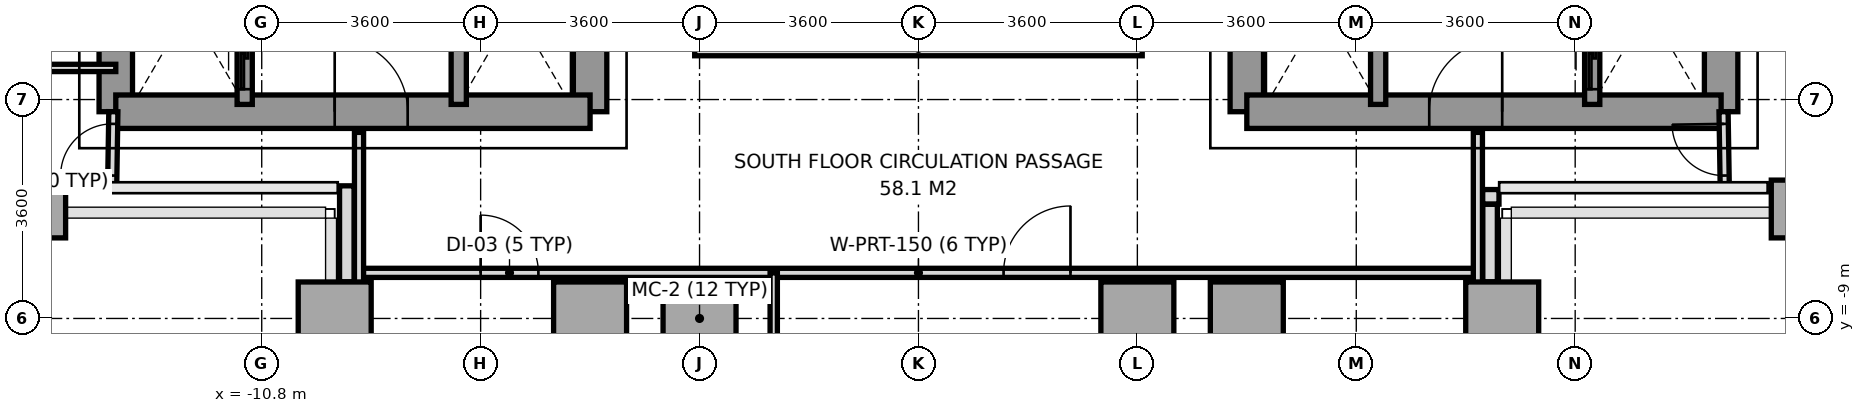
"""IFC4 building model, lengths in metres.
Left out: names, types, materials, properties, quantities, classifications, styles, units other than length and angle.
Written with IfcOpenShell. Run it as: python <this file> out.ifc"""

import sys

from ifc_helpers import new_model, si_unit, direction, frame, frame_2d, origin, origin_2d, place, context, subcontext, project, spatial, rectangle, extrude, source, transform, mapped, element, fill, save


model = new_model("IFC4")
c1 = context("Model", 3, precision=1e-05, world=origin(), true_north=direction((0.0, 1.0)))
c2 = subcontext(c1, "Body", "Model", "MODEL_VIEW")
j1 = project(units=[si_unit("LENGTHUNIT", "METRE"), si_unit("PLANEANGLEUNIT", "RADIAN")], contexts=[c1])
p1 = place(None, origin())
s1 = spatial("IfcSite", under=j1, at=p1, CompositionType="ELEMENT")
p2 = place(p1, origin())
s2 = spatial("IfcBuilding", under=s1, at=p2, CompositionType="ELEMENT")
p3 = place(p2, frame((0.0, 0.0, 37.4)))
s3 = spatial("IfcBuildingStorey", under=s2, at=p3, CompositionType="ELEMENT", Elevation=37.4)
m1 = source(origin(), c2, "Body", "SweptSolid", [
    extrude(rectangle(XDim=0.75, YDim=0.95, at=origin_2d()), origin(), (0.0, 0.0, 1.0), 3.2),
])
p4 = place(p3, frame((-14.4, -7.2, 0.0), z_axis=(0.0, 0.0, 1.0), x_axis=(1.0, 0.0, 0.0)))
e1 = element("IfcColumn", 1, at=p4, inside=s3, PredefinedType="COLUMN", context=c2, shape_type="MappedRepresentation", body=[
    mapped(m1, transform((0.0, 0.0, 0.0), x_axis=(1.0, 0.0, 0.0), y_axis=(0.0, 1.0, 0.0), z_axis=(0.0, 0.0, 1.0), scale=1.0)),
])
m2 = source(origin(), c2, "Body", "SweptSolid", [
    extrude(rectangle(XDim=1.2, YDim=1.2, at=origin_2d()), origin(), (0.0, 0.0, 1.0), 3.2),
])
for number, where, z_axis, x_axis in (
    (2, (-9.6, -9.0, 0.0), (0.0, 0.0, 1.0), (1.0, 0.0, 0.0)),
    (3, (-5.4, -9.0, 0.0), (0.0, 0.0, 1.0), (1.0, 0.0, 0.0)),
    (4, (-3.6, -9.0, 0.0), (0.0, 0.0, 1.0), (1.0, 0.0, 0.0)),
    (5, (3.6, -9.0, 0.0), (0.0, 0.0, 1.0), (1.0, 0.0, 0.0)),
    (6, (5.4, -9.0, 0.0), (0.0, 0.0, 1.0), (1.0, 0.0, 0.0)),
    (7, (9.6, -9.0, 0.0), (0.0, 0.0, 1.0), (1.0, 0.0, 0.0)),
):
    element("IfcColumn", number, at=place(p3, frame(where, z_axis=z_axis, x_axis=x_axis)), inside=s3, PredefinedType="COLUMN", context=c2, shape_type="MappedRepresentation", body=[
        mapped(m2, transform((0.0, 0.0, 0.0), x_axis=(1.0, 0.0, 0.0), y_axis=(0.0, 1.0, 0.0), z_axis=(0.0, 0.0, 1.0), scale=1.0)),
    ])
p5 = place(p3, frame((14.4, -7.2, 0.0), z_axis=(0.0, 0.0, 1.0), x_axis=(1.0, 0.0, 0.0)))
e8 = element("IfcColumn", 8, at=p5, inside=s3, PredefinedType="COLUMN", context=c2, shape_type="MappedRepresentation", body=[
    mapped(m1, transform((0.0, 0.0, 0.0), x_axis=(1.0, 0.0, 0.0), y_axis=(0.0, 1.0, 0.0), z_axis=(0.0, 0.0, 1.0), scale=1.0)),
])
p6 = place(p3, frame((9.547, -7.0, 0.0), z_axis=(0.0, 0.0, 1.0), x_axis=(-1.0, 0.0, 0.0)))
e9 = element("IfcWall", 9, at=p6, inside=s3, PredefinedType="PARAPET", context=c2, shape_type="SweptSolid", body=[
    extrude(rectangle(XDim=0.269, YDim=0.24, at=frame_2d((0.135, 0.0))), origin(), (0.0, 0.0, 1.0), 1.15),
])
p7 = place(p3, frame((9.4, -7.123, 0.0), z_axis=(0.0, 0.0, 1.0), x_axis=(0.0, -1.0, 0.0)))
e10 = element("IfcWall", 10, at=p7, inside=s3, PredefinedType="PARAPET", context=c2, shape_type="SweptSolid", body=[
    extrude(rectangle(XDim=1.274, YDim=0.24, at=frame_2d((0.637, 0.0))), origin(), (0.0, 0.0, 1.0), 1.15),
])
p8 = place(p3, frame((-9.4, -8.397, 0.0), z_axis=(0.0, 0.0, 1.0), x_axis=(0.0, 1.0, 0.0)))
e11 = element("IfcWall", 11, at=p8, inside=s3, PredefinedType="PARAPET", context=c2, shape_type="SweptSolid", body=[
    extrude(rectangle(XDim=1.578, YDim=0.24, at=frame_2d((0.789, 0.0))), origin(), (0.0, 0.0, 1.0), 1.15),
])
p9 = place(p3, frame((-13.2, -5.6, 0.0), z_axis=(0.0, 0.0, 1.0), x_axis=(0.0, 1.0, 0.0)))
e12 = element("IfcWall", 12, at=p9, inside=s3, PredefinedType="SHEAR", context=c2, shape_type="SweptSolid", body=[
    extrude(rectangle(XDim=11.2, YDim=0.55, at=frame_2d((5.6, 0.0))), origin(), (0.0, 0.0, 1.0), 3.2),
])
p10 = place(p3, frame((-5.4, -5.6, 0.0), z_axis=(0.0, 0.0, 1.0), x_axis=(0.0, 1.0, 0.0)))
e13 = element("IfcWall", 13, at=p10, inside=s3, PredefinedType="SHEAR", context=c2, shape_type="SweptSolid", body=[
    extrude(rectangle(XDim=12.5, YDim=0.55, at=frame_2d((6.25, 0.0))), origin(), (0.0, 0.0, 1.0), 3.2),
])
p11 = place(p10, frame((4.55, 0.0, 0.0)))
e14 = element("IfcOpeningElement", 14, at=p11, cuts=e13, PredefinedType="OPENING", context=c2, shape_type="SweptSolid", body=[
    extrude(rectangle(XDim=1.2, YDim=2.2, at=frame_2d((0.6, 1.1))), frame((0.0, 0.285, 0.0), z_axis=(0.0, -1.0, 0.0), x_axis=(1.0, 0.0, 0.0)), (0.0, 0.0, 1.0), 0.57),
])
p12 = place(p10, frame((6.86, 0.0, 0.0)))
e15 = element("IfcOpeningElement", 15, at=p12, cuts=e13, PredefinedType="OPENING", context=c2, shape_type="SweptSolid", body=[
    extrude(rectangle(XDim=0.8, YDim=2.1, at=frame_2d((0.4, 1.05))), frame((0.0, 0.285, 0.0), z_axis=(0.0, -1.0, 0.0), x_axis=(1.0, 0.0, 0.0)), (0.0, 0.0, 1.0), 0.57),
])
p13 = place(p3, frame((-13.2, -5.6, 0.0), z_axis=(0.0, 0.0, 1.0), x_axis=(1.0, 0.0, 0.0)))
e16 = element("IfcWall", 16, at=p13, inside=s3, PredefinedType="SHEAR", context=c2, shape_type="SweptSolid", body=[
    extrude(rectangle(XDim=7.8, YDim=0.55, at=frame_2d((3.9, 0.0))), origin(), (0.0, 0.0, 1.0), 3.2),
])
p14 = place(p13, frame((3.6, 0.0, 0.0)))
e17 = element("IfcOpeningElement", 17, at=p14, cuts=e16, PredefinedType="OPENING", context=c2, shape_type="SweptSolid", body=[
    extrude(rectangle(XDim=1.2, YDim=2.2, at=frame_2d((0.6, 1.1))), frame((0.0, 0.285, 0.0), z_axis=(0.0, -1.0, 0.0), x_axis=(1.0, 0.0, 0.0)), (0.0, 0.0, 1.0), 0.57),
])
p15 = place(p3, frame((13.2, -5.6, 0.0), z_axis=(0.0, 0.0, 1.0), x_axis=(0.0, 1.0, 0.0)))
e18 = element("IfcWall", 18, at=p15, inside=s3, PredefinedType="SHEAR", context=c2, shape_type="SweptSolid", body=[
    extrude(rectangle(XDim=11.2, YDim=0.55, at=frame_2d((5.6, 0.0))), origin(), (0.0, 0.0, 1.0), 3.2),
])
p16 = place(p3, frame((5.4, -5.6, 0.0), z_axis=(0.0, 0.0, 1.0), x_axis=(0.0, 1.0, 0.0)))
e19 = element("IfcWall", 19, at=p16, inside=s3, PredefinedType="SHEAR", context=c2, shape_type="SweptSolid", body=[
    extrude(rectangle(XDim=12.5, YDim=0.55, at=frame_2d((6.25, 0.0))), origin(), (0.0, 0.0, 1.0), 3.2),
])
p17 = place(p16, frame((4.55, 0.0, 0.0)))
e20 = element("IfcOpeningElement", 20, at=p17, cuts=e19, PredefinedType="OPENING", context=c2, shape_type="SweptSolid", body=[
    extrude(rectangle(XDim=1.2, YDim=2.2, at=frame_2d((0.6, 1.1))), frame((0.0, 0.285, 0.0), z_axis=(0.0, -1.0, 0.0), x_axis=(1.0, 0.0, 0.0)), (0.0, 0.0, 1.0), 0.57),
])
p18 = place(p16, frame((6.86, 0.0, 0.0)))
e21 = element("IfcOpeningElement", 21, at=p18, cuts=e19, PredefinedType="OPENING", context=c2, shape_type="SweptSolid", body=[
    extrude(rectangle(XDim=0.8, YDim=2.1, at=frame_2d((0.4, 1.05))), frame((0.0, 0.285, 0.0), z_axis=(0.0, -1.0, 0.0), x_axis=(1.0, 0.0, 0.0)), (0.0, 0.0, 1.0), 0.57),
])
p19 = place(p3, frame((5.4, -5.6, 0.0), z_axis=(0.0, 0.0, 1.0), x_axis=(1.0, 0.0, 0.0)))
e22 = element("IfcWall", 22, at=p19, inside=s3, PredefinedType="SHEAR", context=c2, shape_type="SweptSolid", body=[
    extrude(rectangle(XDim=7.8, YDim=0.55, at=frame_2d((3.9, 0.0))), origin(), (0.0, 0.0, 1.0), 3.2),
])
p20 = place(p19, frame((3.0, 0.0, 0.0)))
e23 = element("IfcOpeningElement", 23, at=p20, cuts=e22, PredefinedType="OPENING", context=c2, shape_type="SweptSolid", body=[
    extrude(rectangle(XDim=1.2, YDim=2.2, at=frame_2d((0.6, 1.1))), frame((0.0, 0.285, 0.0), z_axis=(0.0, -1.0, 0.0), x_axis=(1.0, 0.0, 0.0)), (0.0, 0.0, 1.0), 0.57),
])
p21 = place(p3, frame((-11.08, -5.48, 0.0), z_axis=(0.0, 0.0, 1.0), x_axis=(0.0, 1.0, 0.0)))
e24 = element("IfcWall", 24, at=p21, inside=s3, PredefinedType="SOLIDWALL", context=c2, shape_type="SweptSolid", body=[
    extrude(rectangle(XDim=1.6, YDim=0.25, at=frame_2d((0.8, 0.0))), origin(), (0.0, 0.0, 1.0), 3.2),
])
p22 = place(p21, frame((0.25, 0.0, 0.0)))
e25 = element("IfcOpeningElement", 25, at=p22, cuts=e24, PredefinedType="OPENING", context=c2, shape_type="SweptSolid", body=[
    extrude(rectangle(XDim=1.1, YDim=2.2, at=frame_2d((0.55, 1.1))), frame((0.0, 0.135, 0.0), z_axis=(0.0, -1.0, 0.0), x_axis=(1.0, 0.0, 0.0)), (0.0, 0.0, 1.0), 0.27),
])
p23 = place(p3, frame((11.08, -5.48, 0.0), z_axis=(0.0, 0.0, 1.0), x_axis=(0.0, 1.0, 0.0)))
e26 = element("IfcWall", 26, at=p23, inside=s3, PredefinedType="SOLIDWALL", context=c2, shape_type="SweptSolid", body=[
    extrude(rectangle(XDim=1.6, YDim=0.25, at=frame_2d((0.8, 0.0))), origin(), (0.0, 0.0, 1.0), 3.2),
])
p24 = place(p23, frame((0.25, 0.0, 0.0)))
e27 = element("IfcOpeningElement", 27, at=p24, cuts=e26, PredefinedType="OPENING", context=c2, shape_type="SweptSolid", body=[
    extrude(rectangle(XDim=1.1, YDim=2.2, at=frame_2d((0.55, 1.1))), frame((0.0, 0.135, 0.0), z_axis=(0.0, -1.0, 0.0), x_axis=(1.0, 0.0, 0.0)), (0.0, 0.0, 1.0), 0.27),
])
for number, where, z_axis, x_axis in (
    (28, (-7.56, -5.48, 0.0), (0.0, 0.0, 1.0), (0.0, 1.0, 0.0)),
    (29, (7.56, -5.48, 0.0), (0.0, 0.0, 1.0), (0.0, 1.0, 0.0)),
):
    element("IfcWall", number, at=place(p3, frame(where, z_axis=z_axis, x_axis=x_axis)), inside=s3, PredefinedType="SOLIDWALL", context=c2, shape_type="SweptSolid", body=[
        extrude(rectangle(XDim=1.6, YDim=0.25, at=frame_2d((0.8, 0.0))), origin(), (0.0, 0.0, 1.0), 3.2),
    ])
p25 = place(p3, frame((-9.2, -8.25, 0.0), z_axis=(0.0, 0.0, 1.0), x_axis=(1.0, 0.0, 0.0)))
e30 = element("IfcWall", 30, at=p25, inside=s3, PredefinedType="PARTITIONING", context=c2, shape_type="SweptSolid", body=[
    extrude(rectangle(XDim=18.4, YDim=0.15, at=frame_2d((9.2, 0.0))), origin(), (0.0, 0.0, 1.0), 2.7),
])
p26 = place(p25, frame((2.0, 0.0, 0.0)))
e31 = element("IfcOpeningElement", 31, at=p26, cuts=e30, PredefinedType="OPENING", context=c2, shape_type="SweptSolid", body=[
    extrude(rectangle(XDim=0.95, YDim=2.15, at=frame_2d((0.475, 1.075))), frame((0.0, 0.085, 0.0), z_axis=(0.0, -1.0, 0.0), x_axis=(1.0, 0.0, 0.0)), (0.0, 0.0, 1.0), 0.17),
])
p27 = place(p25, frame((10.6, 0.0, 0.0)))
e32 = element("IfcOpeningElement", 32, at=p27, cuts=e30, PredefinedType="OPENING", context=c2, shape_type="SweptSolid", body=[
    extrude(rectangle(XDim=1.1, YDim=2.2, at=frame_2d((0.55, 1.1))), frame((0.0, 0.085, 0.0), z_axis=(0.0, -1.0, 0.0), x_axis=(1.0, 0.0, 0.0)), (0.0, 0.0, 1.0), 0.17),
])
for number, where, z_axis, x_axis in (
    (33, (-9.2, -15.68, 0.0), (0.0, 0.0, 1.0), (0.0, 1.0, 0.0)),
    (34, (9.2, -15.68, 0.0), (0.0, 0.0, 1.0), (0.0, 1.0, 0.0)),
):
    element("IfcWall", number, at=place(p3, frame(where, z_axis=z_axis, x_axis=x_axis)), inside=s3, PredefinedType="PARTITIONING", context=c2, shape_type="SweptSolid", body=[
        extrude(rectangle(XDim=9.74, YDim=0.15, at=frame_2d((4.87, 0.0))), origin(), (0.0, 0.0, 1.0), 2.65),
    ])
p28 = place(p3, frame((-2.38, -24.65, 0.0), z_axis=(0.0, 0.0, 1.0), x_axis=(0.0, 1.0, 0.0)))
e35 = element("IfcWall", 35, at=p28, inside=s3, PredefinedType="PARTITIONING", context=c2, shape_type="SweptSolid", body=[
    extrude(rectangle(XDim=16.4, YDim=0.12, at=frame_2d((8.2, 0.0))), origin(), (0.0, 0.0, 1.0), 2.65),
])
p29 = place(p3, frame((-13.26, -6.85, 0.0), z_axis=(0.0, 0.0, 1.0), x_axis=(0.016013571389, 0.999871774545, 0.0)))
e36 = element("IfcWall", 36, at=p29, inside=s3, PredefinedType="PARTITIONING", context=c2, shape_type="SweptSolid", body=[
    extrude(rectangle(XDim=1.25, YDim=0.15, at=frame_2d((0.625, 0.0))), origin(), (0.0, 0.0, 1.0), 3.2),
])
p30 = place(p29, frame((0.2, 0.0, 0.0)))
e37 = element("IfcOpeningElement", 37, at=p30, cuts=e36, PredefinedType="OPENING", context=c2, shape_type="SweptSolid", body=[
    extrude(rectangle(XDim=0.85, YDim=2.1, at=frame_2d((0.425, 1.05))), frame((0.0, 0.085, 0.0), z_axis=(0.0, -1.0, 0.0), x_axis=(1.0, 0.0, 0.0)), (0.0, 0.0, 1.0), 0.17),
])
p31 = place(p3, frame((-24.57, -4.88, 0.0), z_axis=(0.0, 0.0, 1.0), x_axis=(1.0, 0.0, 0.0)))
e38 = element("IfcWall", 38, at=p31, inside=s3, PredefinedType="PARTITIONING", context=c2, shape_type="SweptSolid", body=[
    extrude(rectangle(XDim=11.37, YDim=0.12, at=frame_2d((5.685, 0.0))), origin(), (0.0, 0.0, 1.0), 2.7),
])
p32 = place(p31, frame((2.2, 0.0, 0.0)))
e39 = element("IfcOpeningElement", 39, at=p32, cuts=e38, PredefinedType="OPENING", context=c2, shape_type="SweptSolid", body=[
    extrude(rectangle(XDim=0.95, YDim=2.15, at=frame_2d((0.475, 1.075))), frame((0.0, 0.07, 0.0), z_axis=(0.0, -1.0, 0.0), x_axis=(1.0, 0.0, 0.0)), (0.0, 0.0, 1.0), 0.14),
])
p33 = place(p3, frame((13.26, -6.85, 0.0), z_axis=(0.0, 0.0, 1.0), x_axis=(-0.016013571389, 0.999871774545, 0.0)))
e40 = element("IfcWall", 40, at=p33, inside=s3, PredefinedType="PARTITIONING", context=c2, shape_type="SweptSolid", body=[
    extrude(rectangle(XDim=1.25, YDim=0.15, at=frame_2d((0.625, 0.0))), origin(), (0.0, 0.0, 1.0), 3.2),
])
p34 = place(p33, frame((0.2, 0.0, 0.0)))
e41 = element("IfcOpeningElement", 41, at=p34, cuts=e40, PredefinedType="OPENING", context=c2, shape_type="SweptSolid", body=[
    extrude(rectangle(XDim=0.85, YDim=2.1, at=frame_2d((0.425, 1.05))), frame((0.0, 0.085, 0.0), z_axis=(0.0, -1.0, 0.0), x_axis=(1.0, 0.0, 0.0)), (0.0, 0.0, 1.0), 0.17),
])
p35 = place(p3, frame((-3.68, -4.56, 0.0), z_axis=(0.0, 0.0, 1.0), x_axis=(1.0, 0.0, 0.0)))
e42 = element("IfcWall", 42, at=p35, inside=s3, PredefinedType="PARAPET", context=c2, shape_type="SweptSolid", body=[
    extrude(rectangle(XDim=7.36, YDim=0.24, at=frame_2d((3.68, 0.0))), origin(), (0.0, 0.0, 1.0), 1.15),
])
m3 = source(origin(), c2, "Body", "SweptSolid", [
    extrude(rectangle(XDim=1.2, YDim=2.2, at=frame_2d((0.6, 1.1))), frame((0.0, 0.025, 0.0), z_axis=(0.0, -1.0, 0.0), x_axis=(1.0, 0.0, 0.0)), (0.0, 0.0, 1.0), 0.05),
])
p36 = place(p14, origin())
e43 = element("IfcDoor", 43, at=p36, inside=s3, OperationType="SINGLE_SWING_LEFT", PredefinedType="DOOR", context=c2, shape_type="MappedRepresentation", body=[
    mapped(m3, transform((0.0, 0.0, 0.0), x_axis=(1.0, 0.0, 0.0), y_axis=(0.0, 1.0, 0.0), z_axis=(0.0, 0.0, 1.0), scale=1.0)),
])
fill(e17, e43)
p37 = place(p20, origin())
e44 = element("IfcDoor", 44, at=p37, inside=s3, OperationType="SINGLE_SWING_RIGHT", PredefinedType="DOOR", context=c2, shape_type="MappedRepresentation", body=[
    mapped(m3, transform((0.0, 0.0, 0.0), x_axis=(1.0, 0.0, 0.0), y_axis=(0.0, 1.0, 0.0), z_axis=(0.0, 0.0, 1.0), scale=1.0)),
])
fill(e23, e44)
m4 = source(origin(), c2, "Body", "SweptSolid", [
    extrude(rectangle(XDim=1.1, YDim=2.2, at=frame_2d((0.55, 1.1))), frame((0.0, 0.025, 0.0), z_axis=(0.0, -1.0, 0.0), x_axis=(1.0, 0.0, 0.0)), (0.0, 0.0, 1.0), 0.05),
])
p38 = place(p22, origin())
e45 = element("IfcDoor", 45, at=p38, inside=s3, OperationType="SLIDING_TO_LEFT", PredefinedType="DOOR", context=c2, shape_type="MappedRepresentation", body=[
    mapped(m4, transform((0.0, 0.0, 0.0), x_axis=(1.0, 0.0, 0.0), y_axis=(0.0, 1.0, 0.0), z_axis=(0.0, 0.0, 1.0), scale=1.0)),
])
fill(e25, e45)
p39 = place(p24, origin())
e46 = element("IfcDoor", 46, at=p39, inside=s3, OperationType="SLIDING_TO_LEFT", PredefinedType="DOOR", context=c2, shape_type="MappedRepresentation", body=[
    mapped(m4, transform((0.0, 0.0, 0.0), x_axis=(1.0, 0.0, 0.0), y_axis=(0.0, 1.0, 0.0), z_axis=(0.0, 0.0, 1.0), scale=1.0)),
])
fill(e27, e46)
m5 = source(origin(), c2, "Body", "SweptSolid", [
    extrude(rectangle(XDim=0.95, YDim=2.15, at=frame_2d((0.475, 1.075))), frame((0.0, 0.025, 0.0), z_axis=(0.0, -1.0, 0.0), x_axis=(1.0, 0.0, 0.0)), (0.0, 0.0, 1.0), 0.05),
])
p40 = place(p26, origin())
e47 = element("IfcDoor", 47, at=p40, inside=s3, OperationType="SINGLE_SWING_LEFT", PredefinedType="DOOR", context=c2, shape_type="MappedRepresentation", body=[
    mapped(m5, transform((0.0, 0.0, 0.0), x_axis=(1.0, 0.0, 0.0), y_axis=(0.0, 1.0, 0.0), z_axis=(0.0, 0.0, 1.0), scale=1.0)),
])
fill(e31, e47)
p41 = place(p27, origin())
e48 = element("IfcDoor", 48, at=p41, inside=s3, OperationType="SINGLE_SWING_RIGHT", PredefinedType="DOOR", context=c2, shape_type="MappedRepresentation", body=[
    mapped(m4, transform((0.0, 0.0, 0.0), x_axis=(1.0, 0.0, 0.0), y_axis=(0.0, 1.0, 0.0), z_axis=(0.0, 0.0, 1.0), scale=1.0)),
])
fill(e32, e48)
m6 = source(origin(), c2, "Body", "SweptSolid", [
    extrude(rectangle(XDim=0.85, YDim=2.1, at=frame_2d((0.425, 1.05))), frame((0.0, 0.025, 0.0), z_axis=(0.0, -1.0, 0.0), x_axis=(1.0, 0.0, 0.0)), (0.0, 0.0, 1.0), 0.05),
])
p42 = place(p30, origin())
e49 = element("IfcDoor", 49, at=p42, inside=s3, OperationType="SINGLE_SWING_LEFT", PredefinedType="DOOR", context=c2, shape_type="MappedRepresentation", body=[
    mapped(m6, transform((0.0, 0.0, 0.0), x_axis=(1.0, 0.0, 0.0), y_axis=(0.0, 1.0, 0.0), z_axis=(0.0, 0.0, 1.0), scale=1.0)),
])
fill(e37, e49)
p43 = place(p34, origin())
e50 = element("IfcDoor", 50, at=p43, inside=s3, OperationType="SINGLE_SWING_RIGHT", PredefinedType="DOOR", context=c2, shape_type="MappedRepresentation", body=[
    mapped(m6, transform((0.0, 0.0, 0.0), x_axis=(1.0, 0.0, 0.0), y_axis=(0.0, 1.0, 0.0), z_axis=(0.0, 0.0, 1.0), scale=1.0)),
])
fill(e41, e50)
save(model, sys.argv[1])
